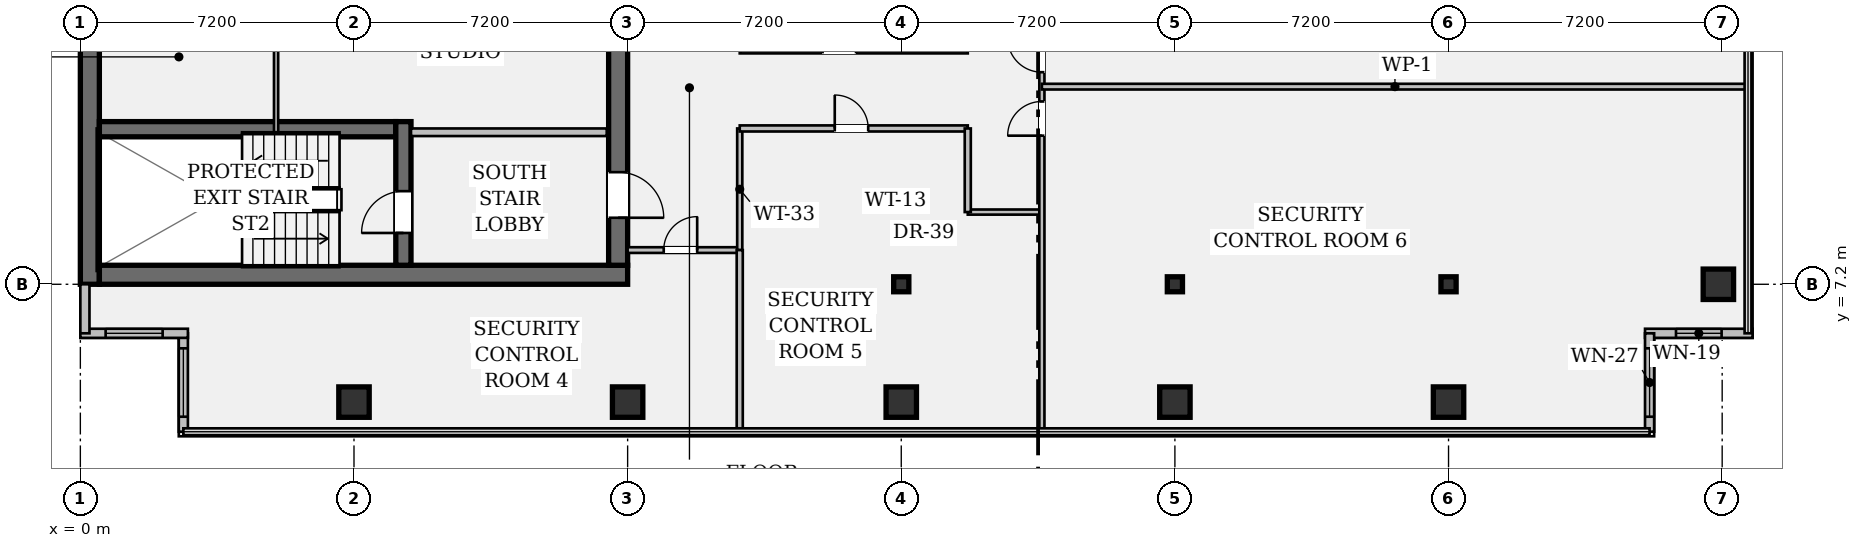
"""IFC4 building model, lengths in metres.
Left out: names, types, materials, properties, quantities, classifications, styles, units other than length and angle.
Written with IfcOpenShell. Run it as: python <this file> out.ifc"""

import sys

from ifc_helpers import new_model, si_unit, direction, frame, frame_2d, origin, origin_2d, place, context, subcontext, project, spatial, rectangle, hollow_rectangle, i_section, extrude, element, fill, save


model = new_model("IFC4")
c1 = context("Model", 3, precision=1e-05, world=origin(), true_north=direction((0.0, 1.0)))
c2 = subcontext(c1, "Body", "Model", "MODEL_VIEW")
j1 = project(units=[si_unit("LENGTHUNIT", "METRE"), si_unit("PLANEANGLEUNIT", "RADIAN")], contexts=[c1])
p1 = place(None, origin())
s1 = spatial("IfcSite", under=j1, at=p1, CompositionType="ELEMENT")
p2 = place(p1, origin())
s2 = spatial("IfcBuilding", under=s1, at=p2, CompositionType="ELEMENT")
p3 = place(p2, frame((0.0, 0.0, 197.75)))
s3 = spatial("IfcBuildingStorey", under=s2, at=p3, CompositionType="ELEMENT", Elevation=197.75)
p4 = place(p3, frame((0.25, 7.2, 0.0), z_axis=(0.0, 0.0, 1.0), x_axis=(0.0, 1.0, 0.0)))
e1 = element("IfcWall", 1, at=p4, inside=s3, PredefinedType="SHEAR", context=c2, shape_type="SweptSolid", body=[
    extrude(rectangle(XDim=28.8, YDim=0.5, at=frame_2d((14.4, 0.0))), origin(), (0.0, 0.0, 1.0), 3.24),
])
p5 = place(p3, frame((0.5, 7.45, 0.0), z_axis=(0.0, 0.0, 1.0), x_axis=(1.0, 0.0, 0.0)))
e2 = element("IfcWall", 2, at=p5, inside=s3, PredefinedType="SHEAR", context=c2, shape_type="SweptSolid", body=[
    extrude(rectangle(XDim=13.9, YDim=0.5, at=frame_2d((6.95, 0.0))), origin(), (0.0, 0.0, 1.0), 3.24),
])
p6 = place(p3, frame((14.15, 35.5, 0.0), z_axis=(0.0, 0.0, 1.0), x_axis=(0.0, -1.0, 0.0)))
e3 = element("IfcWall", 3, at=p6, inside=s3, PredefinedType="SHEAR", context=c2, shape_type="SweptSolid", body=[
    extrude(rectangle(XDim=27.8, YDim=0.5, at=frame_2d((13.9, 0.0))), origin(), (0.0, 0.0, 1.0), 3.24),
])
p7 = place(p6, frame((1.4, 0.0, 0.0)))
e4 = element("IfcOpeningElement", 4, at=p7, cuts=e3, PredefinedType="OPENING", context=c2, shape_type="SweptSolid", body=[
    extrude(rectangle(XDim=1.2, YDim=2.15, at=frame_2d((0.6, 1.075))), frame((0.0, 0.262, 0.0), z_axis=(0.0, -1.0, 0.0), x_axis=(1.0, 0.0, 0.0)), (0.0, 0.0, 1.0), 0.524),
])
p8 = place(p6, frame((25.35, 0.0, 0.0)))
e5 = element("IfcOpeningElement", 5, at=p8, cuts=e3, PredefinedType="OPENING", context=c2, shape_type="SweptSolid", body=[
    extrude(rectangle(XDim=1.2, YDim=2.15, at=frame_2d((0.6, 1.075))), frame((0.0, 0.262, 0.0), z_axis=(0.0, -1.0, 0.0), x_axis=(1.0, 0.0, 0.0)), (0.0, 0.0, 1.0), 0.524),
])
p9 = place(p6, frame((14.7, 0.0, 0.0)))
e6 = element("IfcOpeningElement", 6, at=p9, cuts=e3, PredefinedType="OPENING", context=c2, shape_type="SweptSolid", body=[
    extrude(rectangle(XDim=1.6, YDim=2.2, at=frame_2d((0.8, 1.1))), frame((0.0, 0.262, 0.0), z_axis=(0.0, -1.0, 0.0), x_axis=(1.0, 0.0, 0.0)), (0.0, 0.0, 1.0), 0.524),
])
p10 = place(p3, frame((0.5, 11.28, 0.0), z_axis=(0.0, 0.0, 1.0), x_axis=(1.0, 0.0, 0.0)))
e7 = element("IfcWall", 7, at=p10, inside=s3, PredefinedType="SHEAR", context=c2, shape_type="SweptSolid", body=[
    extrude(rectangle(XDim=7.8, YDim=0.4, at=frame_2d((3.9, 0.0))), origin(), (0.0, 0.0, 1.0), 3.24),
])
p11 = place(p3, frame((8.5, 7.7, 0.0), z_axis=(0.0, 0.0, 1.0), x_axis=(0.0, 1.0, 0.0)))
e8 = element("IfcWall", 8, at=p11, inside=s3, PredefinedType="SHEAR", context=c2, shape_type="SweptSolid", body=[
    extrude(rectangle(XDim=3.78, YDim=0.4, at=frame_2d((1.89, 0.0))), origin(), (0.0, 0.0, 1.0), 3.24),
])
p12 = place(p11, frame((0.85, 0.0, 0.0)))
e9 = element("IfcOpeningElement", 9, at=p12, cuts=e8, PredefinedType="OPENING", context=c2, shape_type="SweptSolid", body=[
    extrude(rectangle(XDim=1.1, YDim=2.15, at=frame_2d((0.55, 1.075))), frame((0.0, 0.212, 0.0), z_axis=(0.0, -1.0, 0.0), x_axis=(1.0, 0.0, 0.0)), (0.0, 0.0, 1.0), 0.424),
])
for number, where, z_axis, x_axis in (
    (10, (7.2, 4.1, 0.0), (0.0, 0.0, 1.0), (1.0, 0.0, 0.0)),
    (11, (14.4, 4.1, 0.0), (0.0, 0.0, 1.0), (1.0, 0.0, 0.0)),
    (12, (21.6, 4.1, 0.0), (0.0, 0.0, 1.0), (1.0, 0.0, 0.0)),
):
    element("IfcColumn", number, at=place(p3, frame(where, z_axis=z_axis, x_axis=x_axis)), inside=s3, PredefinedType="COLUMN", context=c2, shape_type="SweptSolid", body=[
        extrude(hollow_rectangle(XDim=0.8, YDim=0.8, WallThickness=0.05, at=origin_2d()), origin(), (0.0, 0.0, 1.0), 3.24),
    ])
p13 = place(p3, frame((21.6, 7.2, 0.0), z_axis=(0.0, 0.0, 1.0), x_axis=(1.0, 0.0, 0.0)))
e13 = element("IfcColumn", 13, at=p13, inside=s3, PredefinedType="COLUMN", context=c2, shape_type="SweptSolid", body=[
    extrude(i_section(OverallWidth=0.399, OverallDepth=0.394, WebThickness=0.023, FlangeThickness=0.037, FilletRadius=0.018, at=origin_2d()), origin(), (0.0, 0.0, 1.0), 3.24),
])
p14 = place(p3, frame((28.8, 4.1, 0.0), z_axis=(0.0, 0.0, 1.0), x_axis=(1.0, 0.0, 0.0)))
e14 = element("IfcColumn", 14, at=p14, inside=s3, PredefinedType="COLUMN", context=c2, shape_type="SweptSolid", body=[
    extrude(hollow_rectangle(XDim=0.8, YDim=0.8, WallThickness=0.05, at=origin_2d()), origin(), (0.0, 0.0, 1.0), 3.24),
])
p15 = place(p3, frame((28.8, 7.2, 0.0), z_axis=(0.0, 0.0, 1.0), x_axis=(1.0, 0.0, 0.0)))
e15 = element("IfcColumn", 15, at=p15, inside=s3, PredefinedType="COLUMN", context=c2, shape_type="SweptSolid", body=[
    extrude(i_section(OverallWidth=0.399, OverallDepth=0.394, WebThickness=0.023, FlangeThickness=0.037, FilletRadius=0.018, at=origin_2d()), origin(), (0.0, 0.0, 1.0), 3.24),
])
p16 = place(p3, frame((36.0, 4.1, 0.0), z_axis=(0.0, 0.0, 1.0), x_axis=(1.0, 0.0, 0.0)))
e16 = element("IfcColumn", 16, at=p16, inside=s3, PredefinedType="COLUMN", context=c2, shape_type="SweptSolid", body=[
    extrude(hollow_rectangle(XDim=0.8, YDim=0.8, WallThickness=0.05, at=origin_2d()), origin(), (0.0, 0.0, 1.0), 3.24),
])
p17 = place(p3, frame((36.0, 7.2, 0.0), z_axis=(0.0, 0.0, 1.0), x_axis=(1.0, 0.0, 0.0)))
e17 = element("IfcColumn", 17, at=p17, inside=s3, PredefinedType="COLUMN", context=c2, shape_type="SweptSolid", body=[
    extrude(i_section(OverallWidth=0.399, OverallDepth=0.394, WebThickness=0.023, FlangeThickness=0.037, FilletRadius=0.018, at=origin_2d()), origin(), (0.0, 0.0, 1.0), 3.24),
])
p18 = place(p3, frame((43.1, 7.2, 0.0), z_axis=(0.0, 0.0, 1.0), x_axis=(1.0, 0.0, 0.0)))
e18 = element("IfcColumn", 18, at=p18, inside=s3, PredefinedType="COLUMN", context=c2, shape_type="SweptSolid", body=[
    extrude(hollow_rectangle(XDim=0.8, YDim=0.8, WallThickness=0.05, at=origin_2d()), origin(), (0.0, 0.0, 1.0), 3.24),
])
p19 = place(p3, frame((2.71, 3.32, 0.0), z_axis=(0.0, 0.0, 1.0), x_axis=(0.0, 1.0, 0.0)))
e19 = element("IfcWall", 19, at=p19, inside=s3, PredefinedType="STANDARD", context=c2, shape_type="SweptSolid", body=[
    extrude(rectangle(XDim=2.59, YDim=0.24, at=frame_2d((1.295, 0.0))), origin(), (0.0, 0.0, 1.0), 3.24),
])
p20 = place(p19, frame((0.395, 0.0, 0.95)))
e20 = element("IfcOpeningElement", 20, at=p20, cuts=e19, PredefinedType="OPENING", context=c2, shape_type="SweptSolid", body=[
    extrude(rectangle(XDim=1.8, YDim=1.35, at=frame_2d((0.9, 0.675))), frame((0.0, 0.132, 0.0), z_axis=(0.0, -1.0, 0.0), x_axis=(1.0, 0.0, 0.0)), (0.0, 0.0, 1.0), 0.264),
])
p21 = place(p3, frame((2.83, 5.91, 0.0), z_axis=(0.0, 0.0, 1.0), x_axis=(-1.0, 0.0, 0.0)))
e21 = element("IfcWall", 21, at=p21, inside=s3, PredefinedType="STANDARD", context=c2, shape_type="SweptSolid", body=[
    extrude(rectangle(XDim=2.83, YDim=0.24, at=frame_2d((1.415, 0.0))), origin(), (0.0, 0.0, 1.0), 3.24),
])
p22 = place(p21, frame((0.665, 0.0, 0.95)))
e22 = element("IfcOpeningElement", 22, at=p22, cuts=e21, PredefinedType="OPENING", context=c2, shape_type="SweptSolid", body=[
    extrude(rectangle(XDim=1.5, YDim=1.8, at=frame_2d((0.75, 0.9))), frame((0.0, 0.132, 0.0), z_axis=(0.0, -1.0, 0.0), x_axis=(1.0, 0.0, 0.0)), (0.0, 0.0, 1.0), 0.264),
])
p23 = place(p3, frame((0.12, 5.91, 0.0), z_axis=(0.0, 0.0, 1.0), x_axis=(0.0, 1.0, 0.0)))
e23 = element("IfcWall", 23, at=p23, inside=s3, PredefinedType="STANDARD", context=c2, shape_type="SweptSolid", body=[
    extrude(rectangle(XDim=1.29, YDim=0.24, at=frame_2d((0.645, 0.0))), origin(), (0.0, 0.0, 1.0), 3.24),
])
p24 = place(p3, frame((44.0, 5.91, 0.0), z_axis=(0.0, 0.0, 1.0), x_axis=(-1.0, 0.0, 0.0)))
e24 = element("IfcWall", 24, at=p24, inside=s3, PredefinedType="STANDARD", context=c2, shape_type="SweptSolid", body=[
    extrude(rectangle(XDim=2.83, YDim=0.24, at=frame_2d((1.415, 0.0))), origin(), (0.0, 0.0, 1.0), 3.24),
])
p25 = place(p24, frame((0.815, 0.0, 0.95)))
e25 = element("IfcOpeningElement", 25, at=p25, cuts=e24, PredefinedType="OPENING", context=c2, shape_type="SweptSolid", body=[
    extrude(rectangle(XDim=1.2, YDim=1.8, at=frame_2d((0.6, 0.9))), frame((0.0, 0.132, 0.0), z_axis=(0.0, -1.0, 0.0), x_axis=(1.0, 0.0, 0.0)), (0.0, 0.0, 1.0), 0.264),
])
p26 = place(p3, frame((41.29, 5.91, 0.0), z_axis=(0.0, 0.0, 1.0), x_axis=(0.0, -1.0, 0.0)))
e26 = element("IfcWall", 26, at=p26, inside=s3, PredefinedType="STANDARD", context=c2, shape_type="SweptSolid", body=[
    extrude(rectangle(XDim=2.59, YDim=0.24, at=frame_2d((1.295, 0.0))), origin(), (0.0, 0.0, 1.0), 3.24),
])
p27 = place(p26, frame((0.395, 0.0, 0.95)))
e27 = element("IfcOpeningElement", 27, at=p27, cuts=e26, PredefinedType="OPENING", context=c2, shape_type="SweptSolid", body=[
    extrude(rectangle(XDim=1.8, YDim=1.35, at=frame_2d((0.9, 0.675))), frame((0.0, 0.132, 0.0), z_axis=(0.0, -1.0, 0.0), x_axis=(1.0, 0.0, 0.0)), (0.0, 0.0, 1.0), 0.264),
])
p28 = place(p3, frame((8.7, 11.2, 0.0), z_axis=(0.0, 0.0, 1.0), x_axis=(1.0, 0.0, 0.0)))
e28 = element("IfcWall", 28, at=p28, inside=s3, PredefinedType="PARTITIONING", context=c2, shape_type="SweptSolid", body=[
    extrude(rectangle(XDim=5.15, YDim=0.2, at=frame_2d((2.575, 0.0))), origin(), (0.0, 0.0, 1.0), 3.24),
])
p29 = place(p3, frame((5.15, 11.2, 0.0), z_axis=(0.0, 0.0, 1.0), x_axis=(0.0, 1.0, 0.0)))
e29 = element("IfcWall", 29, at=p29, inside=s3, PredefinedType="PARTITIONING", context=c2, shape_type="SweptSolid", body=[
    extrude(rectangle(XDim=6.6, YDim=0.11, at=frame_2d((3.3, 0.0))), origin(), (0.0, 0.0, 1.0), 3.24),
])
p30 = place(p3, frame((14.4, 8.1, 0.0), z_axis=(0.0, 0.0, 1.0), x_axis=(1.0, 0.0, 0.0)))
e30 = element("IfcWall", 30, at=p30, inside=s3, PredefinedType="PARTITIONING", context=c2, shape_type="SweptSolid", body=[
    extrude(rectangle(XDim=2.95, YDim=0.15, at=frame_2d((1.475, 0.0))), origin(), (0.0, 0.0, 1.0), 2.808),
])
p31 = place(p30, frame((0.95, 0.0, 0.0)))
e31 = element("IfcOpeningElement", 31, at=p31, cuts=e30, PredefinedType="OPENING", context=c2, shape_type="SweptSolid", body=[
    extrude(rectangle(XDim=0.88, YDim=2.15, at=frame_2d((0.44, 1.075))), frame((0.0, 0.087, 0.0), z_axis=(0.0, -1.0, 0.0), x_axis=(1.0, 0.0, 0.0)), (0.0, 0.0, 1.0), 0.174),
])
p32 = place(p3, frame((17.35, 8.1, 0.0), z_axis=(0.0, 0.0, 1.0), x_axis=(0.0, 1.0, 0.0)))
e32 = element("IfcWall", 32, at=p32, inside=s3, PredefinedType="PARTITIONING", context=c2, shape_type="SweptSolid", body=[
    extrude(rectangle(XDim=3.2, YDim=0.135, at=frame_2d((1.6, 0.0))), origin(), (0.0, 0.0, 1.0), 3.24),
])
p33 = place(p3, frame((17.35, 11.3, 0.0), z_axis=(0.0, 0.0, 1.0), x_axis=(1.0, 0.0, 0.0)))
e33 = element("IfcWall", 33, at=p33, inside=s3, PredefinedType="PARTITIONING", context=c2, shape_type="SweptSolid", body=[
    extrude(rectangle(XDim=6.0, YDim=0.16, at=frame_2d((3.0, 0.0))), origin(), (0.0, 0.0, 1.0), 2.613),
])
p34 = place(p33, frame((2.5, 0.0, 0.0)))
e34 = element("IfcOpeningElement", 34, at=p34, cuts=e33, PredefinedType="OPENING", context=c2, shape_type="SweptSolid", body=[
    extrude(rectangle(XDim=0.88, YDim=2.15, at=frame_2d((0.44, 1.075))), frame((0.0, 0.092, 0.0), z_axis=(0.0, -1.0, 0.0), x_axis=(1.0, 0.0, 0.0)), (0.0, 0.0, 1.0), 0.184),
])
p35 = place(p3, frame((17.35, 13.35, 0.0), z_axis=(0.0, 0.0, 1.0), x_axis=(1.0, 0.0, 0.0)))
e35 = element("IfcWall", 35, at=p35, inside=s3, PredefinedType="PARTITIONING", context=c2, shape_type="SweptSolid", body=[
    extrude(rectangle(XDim=6.0, YDim=0.15, at=frame_2d((3.0, 0.0))), origin(), (0.0, 0.0, 1.0), 2.613),
])
p36 = place(p35, frame((2.18, 0.0, 0.0)))
e36 = element("IfcOpeningElement", 36, at=p36, cuts=e35, PredefinedType="OPENING", context=c2, shape_type="SweptSolid", body=[
    extrude(rectangle(XDim=0.88, YDim=2.15, at=frame_2d((0.44, 1.075))), frame((0.0, 0.087, 0.0), z_axis=(0.0, -1.0, 0.0), x_axis=(1.0, 0.0, 0.0)), (0.0, 0.0, 1.0), 0.174),
])
p37 = place(p3, frame((23.35, 9.1, 0.0), z_axis=(0.0, 0.0, 1.0), x_axis=(1.0, 0.0, 0.0)))
e37 = element("IfcWall", 37, at=p37, inside=s3, PredefinedType="PARTITIONING", context=c2, shape_type="SweptSolid", body=[
    extrude(rectangle(XDim=1.95, YDim=0.135, at=frame_2d((0.975, 0.0))), origin(), (0.0, 0.0, 1.0), 2.808),
])
p38 = place(p3, frame((23.35, 9.1, 0.0), z_axis=(0.0, 0.0, 1.0), x_axis=(0.0, 1.0, 0.0)))
e38 = element("IfcWall", 38, at=p38, inside=s3, PredefinedType="PARTITIONING", context=c2, shape_type="SweptSolid", body=[
    extrude(rectangle(XDim=2.2, YDim=0.16, at=frame_2d((1.1, 0.0))), origin(), (0.0, 0.0, 1.0), 2.808),
])
p39 = place(p3, frame((25.3, 3.32, 0.0), z_axis=(0.0, 0.0, 1.0), x_axis=(0.0, 1.0, 0.0)))
e39 = element("IfcWall", 39, at=p39, inside=s3, PredefinedType="PARTITIONING", context=c2, shape_type="SweptSolid", body=[
    extrude(rectangle(XDim=21.76, YDim=0.135, at=frame_2d((10.88, 0.0))), origin(), (0.0, 0.0, 1.0), 2.613),
])
p40 = place(p39, frame((7.79, 0.0, 0.0)))
e40 = element("IfcOpeningElement", 40, at=p40, cuts=e39, PredefinedType="OPENING", context=c2, shape_type="SweptSolid", body=[
    extrude(rectangle(XDim=0.9, YDim=2.15, at=frame_2d((0.45, 1.075))), frame((0.0, 0.08, 0.0), z_axis=(0.0, -1.0, 0.0), x_axis=(1.0, 0.0, 0.0)), (0.0, 0.0, 1.0), 0.159),
])
p41 = place(p39, frame((9.46, 0.0, 0.0)))
e41 = element("IfcOpeningElement", 41, at=p41, cuts=e39, PredefinedType="OPENING", context=c2, shape_type="SweptSolid", body=[
    extrude(rectangle(XDim=0.9, YDim=2.15, at=frame_2d((0.45, 1.075))), frame((0.0, 0.08, 0.0), z_axis=(0.0, -1.0, 0.0), x_axis=(1.0, 0.0, 0.0)), (0.0, 0.0, 1.0), 0.159),
])
p42 = place(p3, frame((17.35, 3.32, 0.0), z_axis=(0.0, 0.0, 1.0), x_axis=(0.0, 1.0, 0.0)))
e42 = element("IfcWall", 42, at=p42, inside=s3, PredefinedType="PARTITIONING", context=c2, shape_type="SweptSolid", body=[
    extrude(rectangle(XDim=4.78, YDim=0.16, at=frame_2d((2.39, 0.0))), origin(), (0.0, 0.0, 1.0), 2.613),
])
p43 = place(p3, frame((25.3, 12.4, 0.0), z_axis=(0.0, 0.0, 1.0), x_axis=(1.0, 0.0, 0.0)))
e43 = element("IfcWall", 43, at=p43, inside=s3, PredefinedType="PARTITIONING", context=c2, shape_type="SweptSolid", body=[
    extrude(rectangle(XDim=18.58, YDim=0.15, at=frame_2d((9.29, 0.0))), origin(), (0.0, 0.0, 1.0), 2.613),
])
p44 = place(p20, origin())
e44 = element("IfcWindow", 44, at=p44, inside=s3, PartitioningType="SINGLE_PANEL", PredefinedType="WINDOW", context=c2, shape_type="SweptSolid", body=[
    extrude(rectangle(XDim=1.8, YDim=1.35, at=frame_2d((0.9, 0.675))), frame((0.0, 0.03, 0.0), z_axis=(0.0, -1.0, 0.0), x_axis=(1.0, 0.0, 0.0)), (0.0, 0.0, 1.0), 0.06),
])
fill(e20, e44)
p45 = place(p22, origin())
e45 = element("IfcWindow", 45, at=p45, inside=s3, PartitioningType="SINGLE_PANEL", PredefinedType="WINDOW", context=c2, shape_type="SweptSolid", body=[
    extrude(rectangle(XDim=1.5, YDim=1.8, at=frame_2d((0.75, 0.9))), frame((0.0, 0.03, 0.0), z_axis=(0.0, -1.0, 0.0), x_axis=(1.0, 0.0, 0.0)), (0.0, 0.0, 1.0), 0.06),
])
fill(e22, e45)
p46 = place(p25, origin())
e46 = element("IfcWindow", 46, at=p46, inside=s3, PartitioningType="SINGLE_PANEL", PredefinedType="WINDOW", context=c2, shape_type="SweptSolid", body=[
    extrude(rectangle(XDim=1.2, YDim=1.8, at=frame_2d((0.6, 0.9))), frame((0.0, 0.03, 0.0), z_axis=(0.0, -1.0, 0.0), x_axis=(1.0, 0.0, 0.0)), (0.0, 0.0, 1.0), 0.06),
])
fill(e25, e46)
p47 = place(p27, origin())
e47 = element("IfcWindow", 47, at=p47, inside=s3, PartitioningType="SINGLE_PANEL", PredefinedType="WINDOW", context=c2, shape_type="SweptSolid", body=[
    extrude(rectangle(XDim=1.8, YDim=1.35, at=frame_2d((0.9, 0.675))), frame((0.0, 0.03, 0.0), z_axis=(0.0, -1.0, 0.0), x_axis=(1.0, 0.0, 0.0)), (0.0, 0.0, 1.0), 0.06),
])
fill(e27, e47)
p48 = place(p12, origin())
e48 = element("IfcDoor", 48, at=p48, inside=s3, OperationType="SINGLE_SWING_LEFT", PredefinedType="DOOR", context=c2, shape_type="SweptSolid", body=[
    extrude(rectangle(XDim=1.1, YDim=2.15, at=frame_2d((0.55, 1.075))), frame((0.0, 0.025, 0.0), z_axis=(0.0, -1.0, 0.0), x_axis=(1.0, 0.0, 0.0)), (0.0, 0.0, 1.0), 0.05),
])
fill(e9, e48)
p49 = place(p8, origin())
e49 = element("IfcDoor", 49, at=p49, inside=s3, OperationType="SINGLE_SWING_RIGHT", PredefinedType="DOOR", context=c2, shape_type="SweptSolid", body=[
    extrude(rectangle(XDim=1.2, YDim=2.15, at=frame_2d((0.6, 1.075))), frame((0.0, 0.025, 0.0), z_axis=(0.0, -1.0, 0.0), x_axis=(1.0, 0.0, 0.0)), (0.0, 0.0, 1.0), 0.05),
])
fill(e5, e49)
p50 = place(p31, origin())
e50 = element("IfcDoor", 50, at=p50, inside=s3, OperationType="SINGLE_SWING_RIGHT", PredefinedType="DOOR", context=c2, shape_type="SweptSolid", body=[
    extrude(rectangle(XDim=0.88, YDim=2.15, at=frame_2d((0.44, 1.075))), frame((0.0, 0.025, 0.0), z_axis=(0.0, -1.0, 0.0), x_axis=(1.0, 0.0, 0.0)), (0.0, 0.0, 1.0), 0.05),
])
fill(e31, e50)
p51 = place(p34, origin())
e51 = element("IfcDoor", 51, at=p51, inside=s3, OperationType="SINGLE_SWING_LEFT", PredefinedType="DOOR", context=c2, shape_type="SweptSolid", body=[
    extrude(rectangle(XDim=0.88, YDim=2.15, at=frame_2d((0.44, 1.075))), frame((0.0, 0.025, 0.0), z_axis=(0.0, -1.0, 0.0), x_axis=(1.0, 0.0, 0.0)), (0.0, 0.0, 1.0), 0.05),
])
fill(e34, e51)
p52 = place(p40, origin())
e52 = element("IfcDoor", 52, at=p52, inside=s3, OperationType="SINGLE_SWING_LEFT", PredefinedType="DOOR", context=c2, shape_type="SweptSolid", body=[
    extrude(rectangle(XDim=0.9, YDim=2.15, at=frame_2d((0.45, 1.075))), frame((0.0, 0.025, 0.0), z_axis=(0.0, -1.0, 0.0), x_axis=(1.0, 0.0, 0.0)), (0.0, 0.0, 1.0), 0.05),
])
fill(e40, e52)
p53 = place(p41, origin())
e53 = element("IfcDoor", 53, at=p53, inside=s3, OperationType="SINGLE_SWING_RIGHT", PredefinedType="DOOR", context=c2, shape_type="SweptSolid", body=[
    extrude(rectangle(XDim=0.9, YDim=2.15, at=frame_2d((0.45, 1.075))), frame((0.0, 0.025, 0.0), z_axis=(0.0, -1.0, 0.0), x_axis=(1.0, 0.0, 0.0)), (0.0, 0.0, 1.0), 0.05),
])
fill(e41, e53)
save(model, sys.argv[1])
